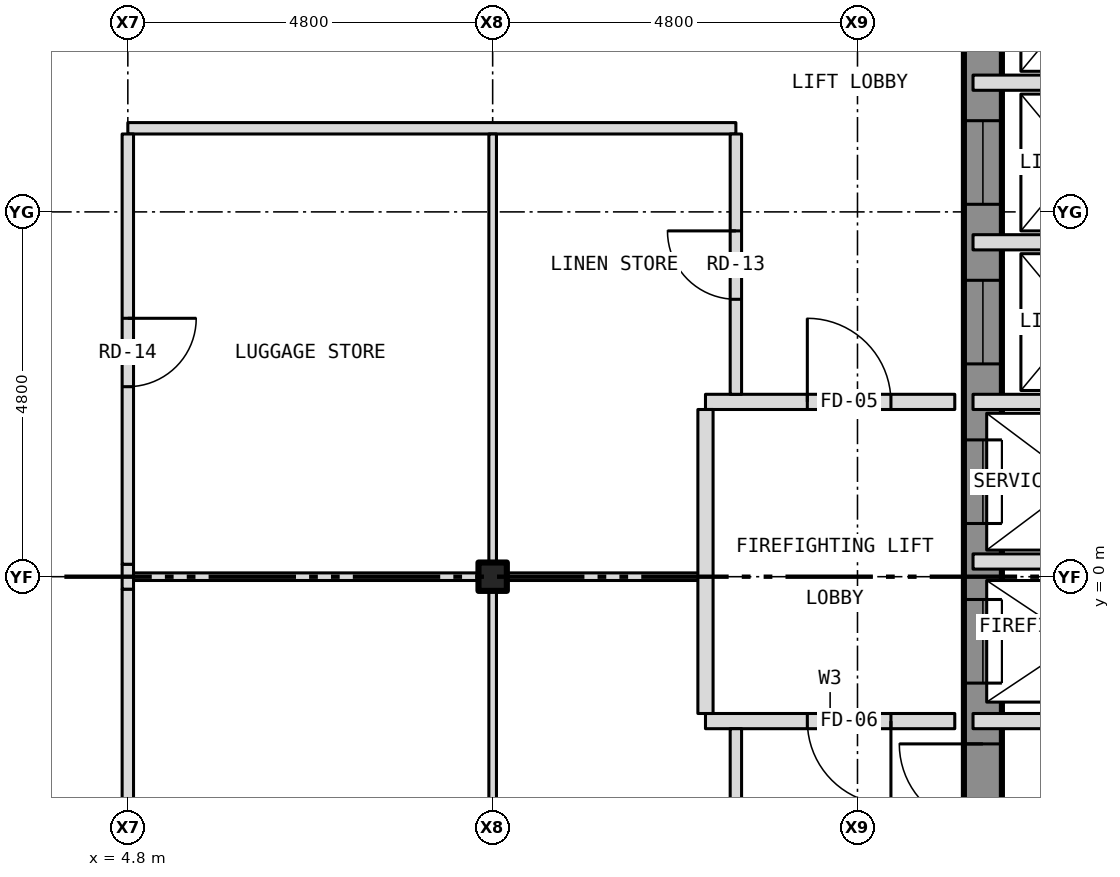
"""IFC4 building model, lengths in metres.
Left out: names, types, materials, properties, quantities, classifications, styles, units other than length and angle.
Written with IfcOpenShell. Run it as: python <this file> out.ifc"""

import sys

from ifc_helpers import new_model, si_unit, direction, frame, frame_2d, origin, origin_2d, place, context, subcontext, project, spatial, rectangle, i_section, extrude, element, fill, save


model = new_model("IFC4")
c1 = context("Model", 3, precision=1e-05, world=origin(), true_north=direction((0.0, 1.0)))
c2 = subcontext(c1, "Body", "Model", "MODEL_VIEW")
j1 = project(units=[si_unit("LENGTHUNIT", "METRE"), si_unit("PLANEANGLEUNIT", "RADIAN")], contexts=[c1])
p1 = place(None, origin())
s1 = spatial("IfcSite", under=j1, at=p1, CompositionType="ELEMENT")
p2 = place(p1, origin())
s2 = spatial("IfcBuilding", under=s1, at=p2, CompositionType="ELEMENT")
p3 = place(p2, frame((0.0, 0.0, 155.0)))
s3 = spatial("IfcBuildingStorey", under=s2, at=p3, CompositionType="ELEMENT", Elevation=155.0)
p4 = place(p3, frame((9.6, 0.0, -0.15), z_axis=(0.0, 0.0, 1.0), x_axis=(1.0, 0.0, 0.0)))
e1 = element("IfcColumn", 1, at=p4, inside=s3, PredefinedType="COLUMN", context=c2, shape_type="SweptSolid", body=[
    extrude(i_section(OverallWidth=0.373, OverallDepth=0.373, WebThickness=0.016, FlangeThickness=0.026, at=origin_2d()), origin(), (0.0, 0.0, 1.0), 3.5),
])
p5 = place(p3, frame((16.05, -10.8, 0.0), z_axis=(0.0, 0.0, 1.0), x_axis=(0.0, 1.0, 0.0)))
e2 = element("IfcWall", 2, at=p5, inside=s3, PredefinedType="SHEAR", context=c2, shape_type="SweptSolid", body=[
    extrude(rectangle(XDim=21.6, YDim=0.5, at=frame_2d((10.8, 0.0))), origin(), (0.0, 0.0, 1.0), 3.25),
])
p6 = place(p5, frame((9.4, 0.0, 0.0)))
e3 = element("IfcOpeningElement", 3, at=p6, cuts=e2, PredefinedType="OPENING", context=c2, shape_type="SweptSolid", body=[
    extrude(rectangle(XDim=1.1, YDim=2.1, at=frame_2d((0.55, 1.05))), frame((0.0, 0.262, 0.0), z_axis=(0.0, -1.0, 0.0), x_axis=(1.0, 0.0, 0.0)), (0.0, 0.0, 1.0), 0.524),
])
p7 = place(p5, frame((11.5, 0.0, 0.0)))
e4 = element("IfcOpeningElement", 4, at=p7, cuts=e2, PredefinedType="OPENING", context=c2, shape_type="SweptSolid", body=[
    extrude(rectangle(XDim=1.1, YDim=2.1, at=frame_2d((0.55, 1.05))), frame((0.0, 0.262, 0.0), z_axis=(0.0, -1.0, 0.0), x_axis=(1.0, 0.0, 0.0)), (0.0, 0.0, 1.0), 0.524),
])
p8 = place(p5, frame((13.6, 0.0, 0.0)))
e5 = element("IfcOpeningElement", 5, at=p8, cuts=e2, PredefinedType="OPENING", context=c2, shape_type="SweptSolid", body=[
    extrude(rectangle(XDim=1.1, YDim=2.1, at=frame_2d((0.55, 1.05))), frame((0.0, 0.262, 0.0), z_axis=(0.0, -1.0, 0.0), x_axis=(1.0, 0.0, 0.0)), (0.0, 0.0, 1.0), 0.524),
])
p9 = place(p5, frame((15.7, 0.0, 0.0)))
e6 = element("IfcOpeningElement", 6, at=p9, cuts=e2, PredefinedType="OPENING", context=c2, shape_type="SweptSolid", body=[
    extrude(rectangle(XDim=1.1, YDim=2.1, at=frame_2d((0.55, 1.05))), frame((0.0, 0.262, 0.0), z_axis=(0.0, -1.0, 0.0), x_axis=(1.0, 0.0, 0.0)), (0.0, 0.0, 1.0), 0.524),
])
p10 = place(p5, frame((17.8, 0.0, 0.0)))
e7 = element("IfcOpeningElement", 7, at=p10, cuts=e2, PredefinedType="OPENING", context=c2, shape_type="SweptSolid", body=[
    extrude(rectangle(XDim=1.1, YDim=2.1, at=frame_2d((0.55, 1.05))), frame((0.0, 0.262, 0.0), z_axis=(0.0, -1.0, 0.0), x_axis=(1.0, 0.0, 0.0)), (0.0, 0.0, 1.0), 0.524),
])
p11 = place(p5, frame((5.642, 0.0, 0.0)))
e8 = element("IfcOpeningElement", 8, at=p11, cuts=e2, PredefinedType="OPENING", context=c2, shape_type="SweptSolid", body=[
    extrude(rectangle(XDim=1.1, YDim=2.1, at=frame_2d((0.55, 1.05))), frame((0.0, 0.262, 0.0), z_axis=(0.0, -1.0, 0.0), x_axis=(1.0, 0.0, 0.0)), (0.0, 0.0, 1.0), 0.524),
])
p12 = place(p5, frame((7.5, 0.0, 0.0)))
e9 = element("IfcOpeningElement", 9, at=p12, cuts=e2, PredefinedType="OPENING", context=c2, shape_type="SweptSolid", body=[
    extrude(rectangle(XDim=1.1, YDim=2.1, at=frame_2d((0.55, 1.05))), frame((0.0, 0.262, 0.0), z_axis=(0.0, -1.0, 0.0), x_axis=(1.0, 0.0, 0.0)), (0.0, 0.0, 1.0), 0.524),
])
p13 = place(p5, frame((20.0, 0.0, 0.0)))
e10 = element("IfcOpeningElement", 10, at=p13, cuts=e2, PredefinedType="OPENING", context=c2, shape_type="SweptSolid", body=[
    extrude(rectangle(XDim=0.9, YDim=2.1, at=frame_2d((0.45, 1.05))), frame((0.0, 0.262, 0.0), z_axis=(0.0, -1.0, 0.0), x_axis=(1.0, 0.0, 0.0)), (0.0, 0.0, 1.0), 0.524),
])
p14 = place(p3, frame((12.4, -1.9, 0.0), z_axis=(0.0, 0.0, 1.0), x_axis=(1.0, 0.0, 0.0)))
e11 = element("IfcWall", 11, at=p14, inside=s3, PredefinedType="PARTITIONING", context=c2, shape_type="SweptSolid", body=[
    extrude(rectangle(XDim=3.28, YDim=0.2, at=frame_2d((1.64, 0.0))), origin(), (0.0, 0.0, 1.0), 3.35),
])
p15 = place(p14, frame((1.34, 0.0, 0.0)))
e12 = element("IfcOpeningElement", 12, at=p15, cuts=e11, PredefinedType="OPENING", context=c2, shape_type="SweptSolid", body=[
    extrude(rectangle(XDim=1.1, YDim=2.1, at=frame_2d((0.55, 1.05))), frame((0.0, 0.112, 0.0), z_axis=(0.0, -1.0, 0.0), x_axis=(1.0, 0.0, 0.0)), (0.0, 0.0, 1.0), 0.224),
])
p16 = place(p3, frame((15.92, -1.9, 0.0), z_axis=(0.0, 0.0, 1.0), x_axis=(1.0, 0.0, 0.0)))
e13 = element("IfcWall", 13, at=p16, inside=s3, PredefinedType="PARTITIONING", context=c2, shape_type="SweptSolid", body=[
    extrude(rectangle(XDim=5.56, YDim=0.2, at=frame_2d((2.78, 0.0))), origin(), (0.0, 0.0, 1.0), 3.25),
])
p17 = place(p16, frame((3.83, 0.0, 0.0)))
e14 = element("IfcOpeningElement", 14, at=p17, cuts=e13, PredefinedType="OPENING", context=c2, shape_type="SweptSolid", body=[
    extrude(rectangle(XDim=0.9, YDim=2.1, at=frame_2d((0.45, 1.05))), frame((0.0, 0.112, 0.0), z_axis=(0.0, -1.0, 0.0), x_axis=(1.0, 0.0, 0.0)), (0.0, 0.0, 1.0), 0.224),
])
p18 = place(p3, frame((4.8, 0.0, 0.0), z_axis=(0.0, 0.0, 1.0), x_axis=(1.0, 0.0, 0.0)))
e15 = element("IfcWall", 15, at=p18, inside=s3, PredefinedType="PARTITIONING", context=c2, shape_type="SweptSolid", body=[
    extrude(rectangle(XDim=4.613, YDim=0.1, at=frame_2d((2.307, 0.0))), origin(), (0.0, 0.0, 1.0), 2.728),
])
p19 = place(p3, frame((9.413, 0.0, 0.0), z_axis=(0.0, 0.0, 1.0), x_axis=(1.0, 0.0, 0.0)))
e16 = element("IfcWall", 16, at=p19, inside=s3, PredefinedType="PARTITIONING", context=c2, shape_type="SweptSolid", body=[
    extrude(rectangle(XDim=0.374, YDim=0.1, at=frame_2d((0.187, 0.0))), origin(), (0.0, 0.0, 1.0), 3.35),
])
p20 = place(p3, frame((9.787, 0.0, 0.0), z_axis=(0.0, 0.0, 1.0), x_axis=(1.0, 0.0, 0.0)))
e17 = element("IfcWall", 17, at=p20, inside=s3, PredefinedType="PARTITIONING", context=c2, shape_type="SweptSolid", body=[
    extrude(rectangle(XDim=2.613, YDim=0.1, at=frame_2d((1.306, 0.0))), origin(), (0.0, 0.0, 1.0), 2.728),
])
p21 = place(p3, frame((15.92, 0.2, 0.0), z_axis=(0.0, 0.0, 1.0), x_axis=(1.0, 0.0, 0.0)))
e18 = element("IfcWall", 18, at=p21, inside=s3, PredefinedType="PARTITIONING", context=c2, shape_type="SweptSolid", body=[
    extrude(rectangle(XDim=2.88, YDim=0.2, at=frame_2d((1.44, 0.0))), origin(), (0.0, 0.0, 1.0), 3.25),
])
p22 = place(p3, frame((12.4, 2.3, 0.0), z_axis=(0.0, 0.0, 1.0), x_axis=(1.0, 0.0, 0.0)))
e19 = element("IfcWall", 19, at=p22, inside=s3, PredefinedType="PARTITIONING", context=c2, shape_type="SweptSolid", body=[
    extrude(rectangle(XDim=3.28, YDim=0.2, at=frame_2d((1.64, 0.0))), origin(), (0.0, 0.0, 1.0), 3.35),
])
p23 = place(p22, frame((1.34, 0.0, 0.0)))
e20 = element("IfcOpeningElement", 20, at=p23, cuts=e19, PredefinedType="OPENING", context=c2, shape_type="SweptSolid", body=[
    extrude(rectangle(XDim=1.1, YDim=2.1, at=frame_2d((0.55, 1.05))), frame((0.0, 0.112, 0.0), z_axis=(0.0, -1.0, 0.0), x_axis=(1.0, 0.0, 0.0)), (0.0, 0.0, 1.0), 0.224),
])
for number, where, z_axis, x_axis in (
    (21, (15.92, 2.3, 0.0), (0.0, 0.0, 1.0), (1.0, 0.0, 0.0)),
    (22, (15.92, 4.4, 0.0), (0.0, 0.0, 1.0), (1.0, 0.0, 0.0)),
):
    element("IfcWall", number, at=place(p3, frame(where, z_axis=z_axis, x_axis=x_axis)), inside=s3, PredefinedType="PARTITIONING", context=c2, shape_type="SweptSolid", body=[
        extrude(rectangle(XDim=2.88, YDim=0.2, at=frame_2d((1.44, 0.0))), origin(), (0.0, 0.0, 1.0), 3.25),
    ])
p24 = place(p3, frame((4.8, 5.9, 0.0), z_axis=(0.0, 0.0, 1.0), x_axis=(1.0, 0.0, 0.0)))
e23 = element("IfcWall", 23, at=p24, inside=s3, PredefinedType="PARTITIONING", context=c2, shape_type="SweptSolid", body=[
    extrude(rectangle(XDim=8.0, YDim=0.15, at=frame_2d((4.0, 0.0))), origin(), (0.0, 0.0, 1.0), 3.35),
])
p25 = place(p3, frame((15.92, 6.5, 0.0), z_axis=(0.0, 0.0, 1.0), x_axis=(1.0, 0.0, 0.0)))
e24 = element("IfcWall", 24, at=p25, inside=s3, PredefinedType="PARTITIONING", context=c2, shape_type="SweptSolid", body=[
    extrude(rectangle(XDim=2.88, YDim=0.2, at=frame_2d((1.44, 0.0))), origin(), (0.0, 0.0, 1.0), 3.25),
])
p26 = place(p3, frame((4.8, -9.436, 0.0), z_axis=(0.0, 0.0, 1.0), x_axis=(0.0, 1.0, 0.0)))
e25 = element("IfcWall", 25, at=p26, inside=s3, PredefinedType="PARTITIONING", context=c2, shape_type="SweptSolid", body=[
    extrude(rectangle(XDim=9.272, YDim=0.15, at=frame_2d((4.636, 0.0))), origin(), (0.0, 0.0, 1.0), 2.817),
])
p27 = place(p26, frame((3.286, 0.0, 0.0)))
e26 = element("IfcOpeningElement", 26, at=p27, cuts=e25, PredefinedType="OPENING", context=c2, shape_type="SweptSolid", body=[
    extrude(rectangle(XDim=0.9, YDim=2.1, at=frame_2d((0.45, 1.05))), frame((0.0, 0.087, 0.0), z_axis=(0.0, -1.0, 0.0), x_axis=(1.0, 0.0, 0.0)), (0.0, 0.0, 1.0), 0.174),
])
p28 = place(p3, frame((4.8, -0.164, 0.0), z_axis=(0.0, 0.0, 1.0), x_axis=(0.0, 1.0, 0.0)))
e27 = element("IfcWall", 27, at=p28, inside=s3, PredefinedType="PARTITIONING", context=c2, shape_type="SweptSolid", body=[
    extrude(rectangle(XDim=0.328, YDim=0.15, at=frame_2d((0.164, 0.0))), origin(), (0.0, 0.0, 1.0), 3.35),
])
p29 = place(p3, frame((4.8, 0.164, 0.0), z_axis=(0.0, 0.0, 1.0), x_axis=(0.0, 1.0, 0.0)))
e28 = element("IfcWall", 28, at=p29, inside=s3, PredefinedType="PARTITIONING", context=c2, shape_type="SweptSolid", body=[
    extrude(rectangle(XDim=5.661, YDim=0.15, at=frame_2d((2.831, 0.0))), origin(), (0.0, 0.0, 1.0), 2.817),
])
p30 = place(p29, frame((2.336, 0.0, 0.0)))
e29 = element("IfcOpeningElement", 29, at=p30, cuts=e28, PredefinedType="OPENING", context=c2, shape_type="SweptSolid", body=[
    extrude(rectangle(XDim=0.9, YDim=2.1, at=frame_2d((0.45, 1.05))), frame((0.0, 0.087, 0.0), z_axis=(0.0, -1.0, 0.0), x_axis=(1.0, 0.0, 0.0)), (0.0, 0.0, 1.0), 0.174),
])
p31 = place(p3, frame((9.6, -9.413, 0.0), z_axis=(0.0, 0.0, 1.0), x_axis=(0.0, 1.0, 0.0)))
e30 = element("IfcWall", 30, at=p31, inside=s3, PredefinedType="PARTITIONING", context=c2, shape_type="SweptSolid", body=[
    extrude(rectangle(XDim=9.363, YDim=0.1, at=frame_2d((4.682, 0.0))), origin(), (0.0, 0.0, 1.0), 2.728),
])
p32 = place(p3, frame((9.6, 0.05, 0.0), z_axis=(0.0, 0.0, 1.0), x_axis=(0.0, 1.0, 0.0)))
e31 = element("IfcWall", 31, at=p32, inside=s3, PredefinedType="PARTITIONING", context=c2, shape_type="SweptSolid", body=[
    extrude(rectangle(XDim=5.775, YDim=0.1, at=frame_2d((2.887, 0.0))), origin(), (0.0, 0.0, 1.0), 2.728),
])
p33 = place(p3, frame((12.4, -1.8, 0.0), z_axis=(0.0, 0.0, 1.0), x_axis=(0.0, 1.0, 0.0)))
e32 = element("IfcWall", 32, at=p33, inside=s3, PredefinedType="PARTITIONING", context=c2, shape_type="SweptSolid", body=[
    extrude(rectangle(XDim=4.0, YDim=0.2, at=frame_2d((2.0, 0.0))), origin(), (0.0, 0.0, 1.0), 3.35),
])
p34 = place(p3, frame((12.8, -11.325, 0.0), z_axis=(0.0, 0.0, 1.0), x_axis=(0.0, 1.0, 0.0)))
e33 = element("IfcWall", 33, at=p34, inside=s3, PredefinedType="PARTITIONING", context=c2, shape_type="SweptSolid", body=[
    extrude(rectangle(XDim=9.325, YDim=0.15, at=frame_2d((4.663, 0.0))), origin(), (0.0, 0.0, 1.0), 3.35),
])
p35 = place(p34, frame((4.525, 0.0, 0.0)))
e34 = element("IfcOpeningElement", 34, at=p35, cuts=e33, PredefinedType="OPENING", context=c2, shape_type="SweptSolid", body=[
    extrude(rectangle(XDim=0.9, YDim=2.1, at=frame_2d((0.45, 1.05))), frame((0.0, 0.087, 0.0), z_axis=(0.0, -1.0, 0.0), x_axis=(1.0, 0.0, 0.0)), (0.0, 0.0, 1.0), 0.174),
])
p36 = place(p3, frame((12.8, 2.4, 0.0), z_axis=(0.0, 0.0, 1.0), x_axis=(0.0, 1.0, 0.0)))
e35 = element("IfcWall", 35, at=p36, inside=s3, PredefinedType="PARTITIONING", context=c2, shape_type="SweptSolid", body=[
    extrude(rectangle(XDim=3.425, YDim=0.15, at=frame_2d((1.712, 0.0))), origin(), (0.0, 0.0, 1.0), 3.35),
])
p37 = place(p36, frame((1.25, 0.0, 0.0)))
e36 = element("IfcOpeningElement", 36, at=p37, cuts=e35, PredefinedType="OPENING", context=c2, shape_type="SweptSolid", body=[
    extrude(rectangle(XDim=0.9, YDim=2.1, at=frame_2d((0.45, 1.05))), frame((0.0, 0.087, 0.0), z_axis=(0.0, -1.0, 0.0), x_axis=(1.0, 0.0, 0.0)), (0.0, 0.0, 1.0), 0.174),
])
p38 = place(p6, origin())
e37 = element("IfcDoor", 37, at=p38, inside=s3, OperationType="SLIDING_TO_LEFT", PredefinedType="DOOR", context=c2, shape_type="SweptSolid", body=[
    extrude(rectangle(XDim=1.1, YDim=2.1, at=frame_2d((0.55, 1.05))), frame((0.0, 0.025, 0.0), z_axis=(0.0, -1.0, 0.0), x_axis=(1.0, 0.0, 0.0)), (0.0, 0.0, 1.0), 0.05),
])
fill(e3, e37)
p39 = place(p7, origin())
e38 = element("IfcDoor", 38, at=p39, inside=s3, OperationType="SLIDING_TO_LEFT", PredefinedType="DOOR", context=c2, shape_type="SweptSolid", body=[
    extrude(rectangle(XDim=1.1, YDim=2.1, at=frame_2d((0.55, 1.05))), frame((0.0, 0.025, 0.0), z_axis=(0.0, -1.0, 0.0), x_axis=(1.0, 0.0, 0.0)), (0.0, 0.0, 1.0), 0.05),
])
fill(e4, e38)
p40 = place(p8, origin())
e39 = element("IfcDoor", 39, at=p40, inside=s3, OperationType="SLIDING_TO_LEFT", PredefinedType="DOOR", context=c2, shape_type="SweptSolid", body=[
    extrude(rectangle(XDim=1.1, YDim=2.1, at=frame_2d((0.55, 1.05))), frame((0.0, 0.025, 0.0), z_axis=(0.0, -1.0, 0.0), x_axis=(1.0, 0.0, 0.0)), (0.0, 0.0, 1.0), 0.05),
])
fill(e5, e39)
p41 = place(p9, origin())
e40 = element("IfcDoor", 40, at=p41, inside=s3, OperationType="SLIDING_TO_LEFT", PredefinedType="DOOR", context=c2, shape_type="SweptSolid", body=[
    extrude(rectangle(XDim=1.1, YDim=2.1, at=frame_2d((0.55, 1.05))), frame((0.0, 0.025, 0.0), z_axis=(0.0, -1.0, 0.0), x_axis=(1.0, 0.0, 0.0)), (0.0, 0.0, 1.0), 0.05),
])
fill(e6, e40)
p42 = place(p12, origin())
e41 = element("IfcDoor", 41, at=p42, inside=s3, OperationType="SINGLE_SWING_RIGHT", PredefinedType="DOOR", context=c2, shape_type="SweptSolid", body=[
    extrude(rectangle(XDim=1.1, YDim=2.1, at=frame_2d((0.55, 1.05))), frame((0.0, 0.025, 0.0), z_axis=(0.0, -1.0, 0.0), x_axis=(1.0, 0.0, 0.0)), (0.0, 0.0, 1.0), 0.05),
])
fill(e9, e41)
p43 = place(p23, origin())
e42 = element("IfcDoor", 42, at=p43, inside=s3, OperationType="SINGLE_SWING_LEFT", PredefinedType="DOOR", context=c2, shape_type="SweptSolid", body=[
    extrude(rectangle(XDim=1.1, YDim=2.1, at=frame_2d((0.55, 1.05))), frame((0.0, 0.025, 0.0), z_axis=(0.0, -1.0, 0.0), x_axis=(1.0, 0.0, 0.0)), (0.0, 0.0, 1.0), 0.05),
])
fill(e20, e42)
p44 = place(p15, origin())
e43 = element("IfcDoor", 43, at=p44, inside=s3, OperationType="SINGLE_SWING_RIGHT", PredefinedType="DOOR", context=c2, shape_type="SweptSolid", body=[
    extrude(rectangle(XDim=1.1, YDim=2.1, at=frame_2d((0.55, 1.05))), frame((0.0, 0.025, 0.0), z_axis=(0.0, -1.0, 0.0), x_axis=(1.0, 0.0, 0.0)), (0.0, 0.0, 1.0), 0.05),
])
fill(e12, e43)
p45 = place(p37, origin())
e44 = element("IfcDoor", 44, at=p45, inside=s3, OperationType="SINGLE_SWING_RIGHT", PredefinedType="DOOR", context=c2, shape_type="SweptSolid", body=[
    extrude(rectangle(XDim=0.9, YDim=2.1, at=frame_2d((0.45, 1.05))), frame((0.0, 0.025, 0.0), z_axis=(0.0, -1.0, 0.0), x_axis=(1.0, 0.0, 0.0)), (0.0, 0.0, 1.0), 0.05),
])
fill(e36, e44)
p46 = place(p30, origin())
e45 = element("IfcDoor", 45, at=p46, inside=s3, OperationType="SINGLE_SWING_RIGHT", PredefinedType="DOOR", context=c2, shape_type="SweptSolid", body=[
    extrude(rectangle(XDim=0.9, YDim=2.1, at=frame_2d((0.45, 1.05))), frame((0.0, 0.025, 0.0), z_axis=(0.0, -1.0, 0.0), x_axis=(1.0, 0.0, 0.0)), (0.0, 0.0, 1.0), 0.05),
])
fill(e29, e45)
save(model, sys.argv[1])
